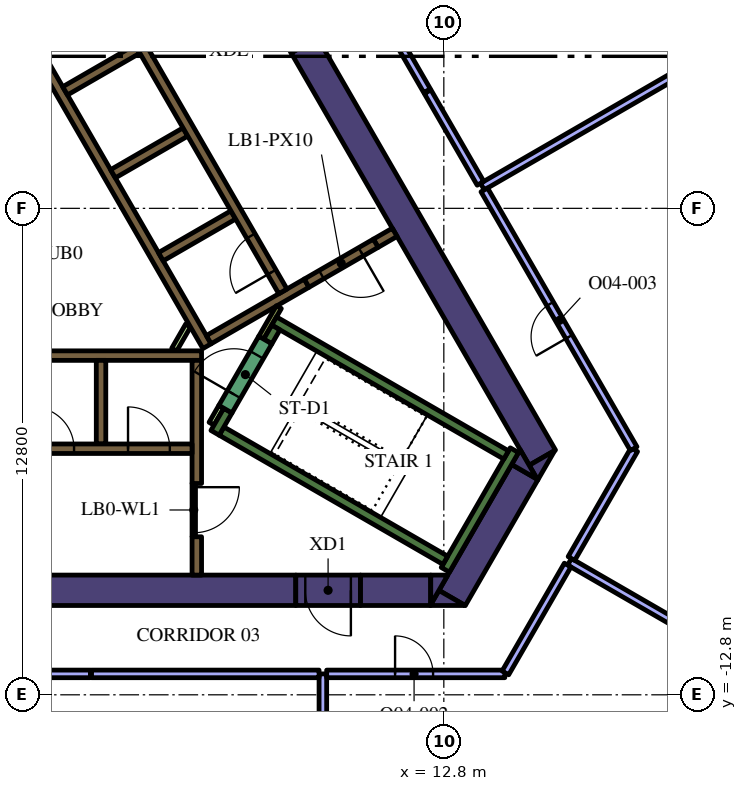
"""IFC4 building model, lengths in metres.
Left out: names, types, materials, properties, quantities, classifications, styles, units other than length and angle.
Written with IfcOpenShell. Run it as: python <this file> out.ifc"""

import sys

from ifc_helpers import new_model, si_unit, direction, frame, frame_2d, origin, place, context, subcontext, project, spatial, polyline, rectangle, outline, extrude, element, fill, save


model = new_model("IFC4")
c1 = context("Model", 3, precision=1e-05, world=origin(), true_north=direction((0.0, 1.0)))
c2 = subcontext(c1, "Body", "Model", "MODEL_VIEW")
j1 = project(units=[si_unit("LENGTHUNIT", "METRE"), si_unit("PLANEANGLEUNIT", "RADIAN")], contexts=[c1])
p1 = place(None, origin())
s1 = spatial("IfcSite", under=j1, at=p1, CompositionType="ELEMENT")
p2 = place(p1, origin())
s2 = spatial("IfcBuilding", under=s1, at=p2, CompositionType="ELEMENT")
p3 = place(p2, frame((0.0, 0.0, 179.4)))
s3 = spatial("IfcBuildingStorey", under=s2, at=p3, CompositionType="ELEMENT", Elevation=179.4)
p4 = place(p3, frame((9.129, 4.289, 0.0), z_axis=(0.0, 0.0, 1.0), x_axis=(0.499995742806, -0.866027861663, 0.0)))
e1 = element("IfcWall", 1, at=p4, inside=s3, PredefinedType="SOLIDWALL", context=c2, shape_type="SweptSolid", body=[
    extrude(rectangle(XDim=12.527, YDim=0.8, at=frame_2d((6.264, 0.0))), origin(), (0.0, 0.0, 1.0), 4.2),
])
p5 = place(p3, origin())
e2 = element("IfcWall", 2, at=p5, inside=s3, PredefinedType="SOLIDWALL", context=c2, shape_type="SweptSolid", body=[
    extrude(outline(polyline([(15.271, -7.15), (15.047, -6.762), (15.719, -6.374), (15.271, -7.15)])), origin(), (0.0, 0.0, 1.0), 4.2),
])
p6 = place(p3, frame((13.018, -10.252, 0.0), z_axis=(0.0, 0.0, 1.0), x_axis=(0.499984020225, 0.866034629516, 0.0)))
e3 = element("IfcWall", 3, at=p6, inside=s3, PredefinedType="SOLIDWALL", context=c2, shape_type="SweptSolid", body=[
    extrude(rectangle(XDim=3.824, YDim=0.8, at=frame_2d((1.912, 0.0))), origin(), (0.0, 0.0, 1.0), 4.2),
])
e4 = element("IfcWall", 4, at=p5, inside=s3, PredefinedType="SOLIDWALL", context=c2, shape_type="SweptSolid", body=[
    extrude(outline(polyline([(12.671, -10.053), (13.358, -10.45), (12.442, -10.45), (12.671, -10.053)])), origin(), (0.0, 0.0, 1.0), 4.2),
])
e5 = element("IfcWall", 5, at=p5, inside=s3, PredefinedType="SOLIDWALL", context=c2, shape_type="SweptSolid", body=[
    extrude(outline(polyline([(14.809, -6.35), (15.257, -7.126), (14.585, -6.738), (14.809, -6.35)])), origin(), (0.0, 0.0, 1.0), 4.2),
])
p7 = place(p3, frame((10.604, -10.05, 0.0), z_axis=(0.0, 0.0, 1.0), x_axis=(1.0, 0.0, 0.0)))
e6 = element("IfcWall", 6, at=p7, inside=s3, PredefinedType="SOLIDWALL", context=c2, shape_type="SweptSolid", body=[
    extrude(rectangle(XDim=1.849, YDim=0.8, at=frame_2d((0.925, 0.0))), origin(), (0.0, 0.0, 1.0), 4.2),
])
e7 = element("IfcWall", 7, at=p5, inside=s3, PredefinedType="SOLIDWALL", context=c2, shape_type="SweptSolid", body=[
    extrude(outline(polyline([(12.904, -9.65), (12.456, -10.426), (12.456, -9.65), (12.904, -9.65)])), origin(), (0.0, 0.0, 1.0), 4.2),
])
p8 = place(p3, frame((-13.378, -10.05, 0.0), z_axis=(0.0, 0.0, 1.0), x_axis=(1.0, 0.0, 0.0)))
e8 = element("IfcWall", 8, at=p8, inside=s3, PredefinedType="SOLIDWALL", context=c2, shape_type="SweptSolid", body=[
    extrude(rectangle(XDim=22.282, YDim=0.8, at=frame_2d((11.141, 0.0))), origin(), (0.0, 0.0, 1.0), 4.2),
])
p9 = place(p3, frame((12.84, -9.511, 0.0), z_axis=(0.0, 0.0, 1.0), x_axis=(0.499997733992, 0.866026712061, 0.0)))
e9 = element("IfcWall", 9, at=p9, inside=s3, PredefinedType="SOLIDWALL", context=c2, shape_type="SweptSolid", body=[
    extrude(rectangle(XDim=3.634, YDim=0.25, at=frame_2d((1.817, 0.0))), origin(), (0.0, 0.0, 1.0), 4.2),
])
p10 = place(p3, frame((12.84, -9.261, 0.0), z_axis=(0.0, 0.0, 1.0), x_axis=(-0.866013990052, 0.500019768644, 0.0)))
e10 = element("IfcWall", 10, at=p10, inside=s3, PredefinedType="SOLIDWALL", context=c2, shape_type="SweptSolid", body=[
    extrude(rectangle(XDim=6.8, YDim=0.25, at=frame_2d((3.4, 0.0))), origin(), (0.0, 0.0, 1.0), 4.2),
])
p11 = place(p3, frame((6.78, -5.906, 0.0), z_axis=(0.0, 0.0, 1.0), x_axis=(0.500223362819, 0.865896406789, 0.0)))
e11 = element("IfcWall", 11, at=p11, inside=s3, PredefinedType="SOLIDWALL", context=c2, shape_type="SweptSolid", body=[
    extrude(rectangle(XDim=0.675, YDim=0.25, at=frame_2d((0.337, 0.0))), origin(), (0.0, 0.0, 1.0), 4.2),
])
p12 = place(p3, frame((8.334, -2.964, 0.0), z_axis=(0.0, 0.0, 1.0), x_axis=(0.866016039709, -0.500016218704, 0.0)))
e12 = element("IfcWall", 12, at=p12, inside=s3, PredefinedType="SOLIDWALL", context=c2, shape_type="SweptSolid", body=[
    extrude(rectangle(XDim=7.05, YDim=0.25, at=frame_2d((3.525, 0.0))), origin(), (0.0, 0.0, 1.0), 4.2),
])
p13 = place(p3, frame((8.168, -3.503, 0.0), z_axis=(0.0, 0.0, 1.0), x_axis=(0.49972245349, 0.866185586049, 0.0)))
e13 = element("IfcWall", 13, at=p13, inside=s3, PredefinedType="SOLIDWALL", context=c2, shape_type="SweptSolid", body=[
    extrude(rectangle(XDim=0.425, YDim=0.25, at=frame_2d((0.212, 0.0))), origin(), (0.0, 0.0, 1.0), 4.2),
])
p14 = place(p3, frame((-5.545, -3.875, 0.0), z_axis=(0.0, 0.0, 1.0), x_axis=(1.0, 0.0, 0.0)))
e14 = element("IfcWall", 14, at=p14, inside=s3, PredefinedType="SOLIDWALL", context=c2, shape_type="SweptSolid", body=[
    extrude(rectangle(XDim=11.97, YDim=0.25, at=frame_2d((5.985, 0.0))), origin(), (0.0, 0.0, 1.0), 4.2),
])
p15 = place(p3, frame((6.3, -7.24, 0.0), z_axis=(0.0, 0.0, 1.0), x_axis=(0.0, 1.0, 0.0)))
e15 = element("IfcWall", 15, at=p15, inside=s3, PredefinedType="SOLIDWALL", context=c2, shape_type="SweptSolid", body=[
    extrude(rectangle(XDim=3.24, YDim=0.25, at=frame_2d((1.62, 0.0))), origin(), (0.0, 0.0, 1.0), 4.2),
])
p16 = place(p3, frame((6.3, -9.65, 0.0), z_axis=(0.0, 0.0, 1.0), x_axis=(0.0, 1.0, 0.0)))
e16 = element("IfcWall", 16, at=p16, inside=s3, PredefinedType="SOLIDWALL", context=c2, shape_type="SweptSolid", body=[
    extrude(rectangle(XDim=1.008, YDim=0.25, at=frame_2d((0.504, 0.0))), origin(), (0.0, 0.0, 1.0), 4.2),
])
p17 = place(p3, frame((3.78, -4.0, 0.0), z_axis=(0.0, 0.0, 1.0), x_axis=(0.0, -1.0, 0.0)))
e17 = element("IfcWall", 17, at=p17, inside=s3, PredefinedType="SOLIDWALL", context=c2, shape_type="SweptSolid", body=[
    extrude(rectangle(XDim=2.2, YDim=0.25, at=frame_2d((1.1, 0.0))), origin(), (0.0, 0.0, 1.0), 4.2),
])
p18 = place(p3, frame((11.507, -0.631, 0.0), z_axis=(0.0, 0.0, 1.0), x_axis=(-0.866093731455, -0.499881634324, 0.0)))
e18 = element("IfcWall", 18, at=p18, inside=s3, PredefinedType="SOLIDWALL", context=c2, shape_type="SweptSolid", body=[
    extrude(rectangle(XDim=0.575, YDim=0.25, at=frame_2d((0.288, 0.0))), origin(), (0.0, 0.0, 1.0), 4.2),
])
p19 = place(p3, frame((6.568, -3.627, 0.0), z_axis=(0.0, 0.0, 1.0), x_axis=(-0.499999455981, 0.866025717874, 0.0)))
e19 = element("IfcWall", 19, at=p19, inside=s3, PredefinedType="SOLIDWALL", context=c2, shape_type="SweptSolid", body=[
    extrude(rectangle(XDim=11.978, YDim=0.25, at=frame_2d((5.989, 0.0))), origin(), (0.0, 0.0, 1.0), 4.2),
])
for number, where, z_axis, x_axis in (
    (20, (2.834, 3.091, 0.0), (0.0, 0.0, 1.0), (0.866, 0.5, 0.0)),
    (21, (4.094, 0.909, 0.0), (0.0, 0.0, 1.0), (0.866, 0.5, 0.0)),
    (22, (5.354, -1.274, 0.0), (0.0, 0.0, 1.0), (0.866, 0.5, 0.0)),
):
    element("IfcWall", number, at=place(p3, frame(where, z_axis=z_axis, x_axis=x_axis)), inside=s3, PredefinedType="SOLIDWALL", context=c2, shape_type="SweptSolid", body=[
        extrude(rectangle(XDim=2.2, YDim=0.25, at=frame_2d((1.1, 0.0))), origin(), (0.0, 0.0, 1.0), 4.2),
    ])
p20 = place(p3, frame((6.614, -3.456, 0.0), z_axis=(0.0, 0.0, 1.0), x_axis=(0.866032512851, 0.499987686533, 0.0)))
e23 = element("IfcWall", 23, at=p20, inside=s3, PredefinedType="SOLIDWALL", context=c2, shape_type="SweptSolid", body=[
    extrude(rectangle(XDim=2.975, YDim=0.25, at=frame_2d((1.487, 0.0))), origin(), (0.0, 0.0, 1.0), 4.2),
])
p21 = place(p3, frame((6.945, -5.222, 0.0), z_axis=(0.0, 0.0, 1.0), x_axis=(-0.499818422106, -0.866130212453, 0.0)))
e24 = element("IfcWall", 24, at=p21, inside=s3, PredefinedType="PARTITIONING", context=c2, shape_type="SweptSolid", body=[
    extrude(rectangle(XDim=0.514, YDim=0.15, at=frame_2d((0.257, 0.0))), origin(), (0.0, 0.0, 1.0), 3.15),
])
p22 = place(p3, frame((8.459, -2.599, 0.0), z_axis=(0.0, 0.0, 1.0), x_axis=(-0.500041054325, -0.866001699761, 0.0)))
e25 = element("IfcWall", 25, at=p22, inside=s3, PredefinedType="PARTITIONING", context=c2, shape_type="SweptSolid", body=[
    extrude(rectangle(XDim=0.929, YDim=0.15, at=frame_2d((0.464, 0.0))), origin(), (0.0, 0.0, 1.0), 4.2),
])
p23 = place(p3, frame((5.705, -3.718, 0.0), z_axis=(0.0, 0.0, 1.0), x_axis=(0.499962090823, 0.866047289552, 0.0)))
e26 = element("IfcWall", 26, at=p23, inside=s3, PredefinedType="PARTITIONING", context=c2, shape_type="SweptSolid", body=[
    extrude(rectangle(XDim=0.735, YDim=0.15, at=frame_2d((0.367, 0.0))), origin(), (0.0, 0.0, 1.0), 3.15),
])
p24 = place(p3, frame((-6.175, -6.325, 0.0), z_axis=(0.0, 0.0, 1.0), x_axis=(1.0, 0.0, 0.0)))
e27 = element("IfcWall", 27, at=p24, inside=s3, PredefinedType="SOLIDWALL", context=c2, shape_type="SweptSolid", body=[
    extrude(rectangle(XDim=12.35, YDim=0.25, at=frame_2d((6.175, 0.0))), origin(), (0.0, 0.0, 1.0), 4.2),
])
p25 = place(p24, frame((0.585, 0.0, 0.0)))
e28 = element("IfcOpeningElement", 28, at=p25, cuts=e27, PredefinedType="OPENING", context=c2, shape_type="SweptSolid", body=[
    extrude(rectangle(XDim=1.1, YDim=2.1, at=frame_2d((0.55, 1.05))), frame((0.0, 0.135, 0.0), z_axis=(0.0, -1.0, 0.0), x_axis=(1.0, 0.0, 0.0)), (0.0, 0.0, 1.0), 0.27),
])
p26 = place(p24, frame((3.105, 0.0, 0.0)))
e29 = element("IfcOpeningElement", 29, at=p26, cuts=e27, PredefinedType="OPENING", context=c2, shape_type="SweptSolid", body=[
    extrude(rectangle(XDim=1.1, YDim=2.1, at=frame_2d((0.55, 1.05))), frame((0.0, 0.135, 0.0), z_axis=(0.0, -1.0, 0.0), x_axis=(1.0, 0.0, 0.0)), (0.0, 0.0, 1.0), 0.27),
])
p27 = place(p24, frame((5.625, 0.0, 0.0)))
e30 = element("IfcOpeningElement", 30, at=p27, cuts=e27, PredefinedType="OPENING", context=c2, shape_type="SweptSolid", body=[
    extrude(rectangle(XDim=1.1, YDim=2.1, at=frame_2d((0.55, 1.05))), frame((0.0, 0.135, 0.0), z_axis=(0.0, -1.0, 0.0), x_axis=(1.0, 0.0, 0.0)), (0.0, 0.0, 1.0), 0.27),
])
p28 = place(p24, frame((8.145, 0.0, 0.0)))
e31 = element("IfcOpeningElement", 31, at=p28, cuts=e27, PredefinedType="OPENING", context=c2, shape_type="SweptSolid", body=[
    extrude(rectangle(XDim=1.1, YDim=2.1, at=frame_2d((0.55, 1.05))), frame((0.0, 0.135, 0.0), z_axis=(0.0, -1.0, 0.0), x_axis=(1.0, 0.0, 0.0)), (0.0, 0.0, 1.0), 0.27),
])
p29 = place(p24, frame((10.665, 0.0, 0.0)))
e32 = element("IfcOpeningElement", 32, at=p29, cuts=e27, PredefinedType="OPENING", context=c2, shape_type="SweptSolid", body=[
    extrude(rectangle(XDim=1.1, YDim=2.1, at=frame_2d((0.55, 1.05))), frame((0.0, 0.135, 0.0), z_axis=(0.0, -1.0, 0.0), x_axis=(1.0, 0.0, 0.0)), (0.0, 0.0, 1.0), 0.27),
])
p30 = place(p3, frame((8.565, -2.185, 0.0), z_axis=(0.0, 0.0, 1.0), x_axis=(-0.499997954832, 0.866026584559, 0.0)))
e33 = element("IfcWall", 33, at=p30, inside=s3, PredefinedType="SOLIDWALL", context=c2, shape_type="SweptSolid", body=[
    extrude(rectangle(XDim=12.35, YDim=0.25, at=frame_2d((6.175, 0.0))), origin(), (0.0, 0.0, 1.0), 4.2),
])
p31 = place(p30, frame((0.585, 0.0, 0.0)))
e34 = element("IfcOpeningElement", 34, at=p31, cuts=e33, PredefinedType="OPENING", context=c2, shape_type="SweptSolid", body=[
    extrude(rectangle(XDim=1.1, YDim=2.1, at=frame_2d((0.55, 1.05))), frame((0.0, 0.135, 0.0), z_axis=(0.0, -1.0, 0.0), x_axis=(1.0, 0.0, 0.0)), (0.0, 0.0, 1.0), 0.27),
])
p32 = place(p3, frame((7.053, -5.284, 0.0), z_axis=(0.0, 0.0, 1.0), x_axis=(0.500078061341, 0.865980330357, 0.0)))
e35 = element("IfcWall", 35, at=p32, inside=s3, PredefinedType="SOLIDWALL", context=c2, shape_type="SweptSolid", body=[
    extrude(rectangle(XDim=2.1, YDim=0.4, at=frame_2d((1.05, 0.0))), origin(), (0.0, 0.0, 1.0), 4.2),
])
p33 = place(p32, frame((0.45, 0.0, 0.0)))
e36 = element("IfcOpeningElement", 36, at=p33, cuts=e35, PredefinedType="OPENING", context=c2, shape_type="SweptSolid", body=[
    extrude(rectangle(XDim=1.2, YDim=2.1, at=frame_2d((0.6, 1.05))), frame((0.0, 0.21, 0.0), z_axis=(0.0, -1.0, 0.0), x_axis=(1.0, 0.0, 0.0)), (0.0, 0.0, 1.0), 0.42),
])
p34 = place(p3, frame((6.22, -7.237, 0.0), z_axis=(0.0, 0.0, 1.0), x_axis=(0.0, -1.0, 0.0)))
e37 = element("IfcWall", 37, at=p34, inside=s3, PredefinedType="PARTITIONING", context=c2, shape_type="SweptSolid", body=[
    extrude(rectangle(XDim=1.4, YDim=0.09, at=frame_2d((0.7, 0.0))), origin(), (0.0, 0.0, 1.0), 3.15),
])
p35 = place(p34, frame((0.1, 0.0, 0.0)))
e38 = element("IfcOpeningElement", 38, at=p35, cuts=e37, PredefinedType="OPENING", context=c2, shape_type="SweptSolid", body=[
    extrude(rectangle(XDim=1.2, YDim=2.1, at=frame_2d((0.6, 1.05))), frame((0.0, 0.055, 0.0), z_axis=(0.0, -1.0, 0.0), x_axis=(1.0, 0.0, 0.0)), (0.0, 0.0, 1.0), 0.11),
])
p36 = place(p3, frame((11.009, -0.919, 0.0), z_axis=(0.0, 0.0, 1.0), x_axis=(-0.866059744384, -0.49994051562, 0.0)))
e39 = element("IfcWall", 39, at=p36, inside=s3, PredefinedType="SOLIDWALL", context=c2, shape_type="SweptSolid", body=[
    extrude(rectangle(XDim=2.1, YDim=0.25, at=frame_2d((1.05, 0.0))), origin(), (0.0, 0.0, 1.0), 4.2),
])
p37 = place(p36, frame((0.45, 0.0, 0.0)))
e40 = element("IfcOpeningElement", 40, at=p37, cuts=e39, PredefinedType="OPENING", context=c2, shape_type="SweptSolid", body=[
    extrude(rectangle(XDim=1.2, YDim=2.1, at=frame_2d((0.6, 1.05))), frame((0.0, 0.135, 0.0), z_axis=(0.0, -1.0, 0.0), x_axis=(1.0, 0.0, 0.0)), (0.0, 0.0, 1.0), 0.27),
])
p38 = place(p3, frame((10.604, -10.05, 0.0), z_axis=(0.0, 0.0, 1.0), x_axis=(-1.0, 0.0, 0.0)))
e41 = element("IfcWall", 41, at=p38, inside=s3, PredefinedType="SOLIDWALL", context=c2, shape_type="SweptSolid", body=[
    extrude(rectangle(XDim=1.7, YDim=0.8, at=frame_2d((0.85, 0.0))), origin(), (0.0, 0.0, 1.0), 4.2),
])
p39 = place(p38, frame((0.25, 0.0, 0.0)))
e42 = element("IfcOpeningElement", 42, at=p39, cuts=e41, PredefinedType="OPENING", context=c2, shape_type="SweptSolid", body=[
    extrude(rectangle(XDim=1.2, YDim=2.1, at=frame_2d((0.6, 1.05))), frame((0.0, 0.41, 0.0), z_axis=(0.0, -1.0, 0.0), x_axis=(1.0, 0.0, 0.0)), (0.0, 0.0, 1.0), 0.82),
])
p40 = place(p3, frame((8.279, 5.761, 0.0), z_axis=(0.0, 0.0, 1.0), x_axis=(0.500062241894, -0.865989465428, 0.0)))
e43 = element("IfcWall", 43, at=p40, inside=s3, PredefinedType="SOLIDWALL", context=c2, shape_type="SweptSolid", body=[
    extrude(rectangle(XDim=1.7, YDim=0.8, at=frame_2d((0.85, 0.0))), origin(), (0.0, 0.0, 1.0), 4.2),
])
p41 = place(p40, frame((0.25, 0.0, 0.0)))
e44 = element("IfcOpeningElement", 44, at=p41, cuts=e43, PredefinedType="OPENING", context=c2, shape_type="SweptSolid", body=[
    extrude(rectangle(XDim=1.2, YDim=2.1, at=frame_2d((0.6, 1.05))), frame((0.0, 0.41, 0.0), z_axis=(0.0, -1.0, 0.0), x_axis=(1.0, 0.0, 0.0)), (0.0, 0.0, 1.0), 0.82),
])
p42 = place(p3, frame((9.617, -12.25, 0.0), z_axis=(0.0, 0.0, 1.0), x_axis=(0.0, -1.0, 0.0)))
e45 = element("IfcWall", 45, at=p42, inside=s3, PredefinedType="PARTITIONING", context=c2, shape_type="SweptSolid", body=[
    extrude(rectangle(XDim=7.761, YDim=0.2, at=frame_2d((3.881, 0.0))), origin(), (0.0, 0.0, 1.0), 3.15),
])
p43 = place(p3, frame((-3.5, -12.25, 0.0), z_axis=(0.0, 0.0, 1.0), x_axis=(1.0, 0.0, 0.0)))
e46 = element("IfcWall", 46, at=p43, inside=s3, PredefinedType="PARTITIONING", context=c2, shape_type="SweptSolid", body=[
    extrude(rectangle(XDim=7.0, YDim=0.2, at=frame_2d((3.5, 0.0))), origin(), (0.0, 0.0, 1.0), 3.15),
])
p44 = place(p43, frame((3.0, 0.0, 0.0)))
e47 = element("IfcOpeningElement", 47, at=p44, cuts=e46, PredefinedType="OPENING", context=c2, shape_type="SweptSolid", body=[
    extrude(rectangle(XDim=1.0, YDim=2.1, at=frame_2d((0.5, 1.05))), frame((0.0, 0.11, 0.0), z_axis=(0.0, -1.0, 0.0), x_axis=(1.0, 0.0, 0.0)), (0.0, 0.0, 1.0), 0.22),
])
p45 = place(p3, frame((3.53, -12.25, 0.0), z_axis=(0.0, 0.0, 1.0), x_axis=(1.0, 0.0, 0.0)))
e48 = element("IfcWall", 48, at=p45, inside=s3, PredefinedType="PARTITIONING", context=c2, shape_type="SweptSolid", body=[
    extrude(rectangle(XDim=5.987, YDim=0.2, at=frame_2d((2.994, 0.0))), origin(), (0.0, 0.0, 1.0), 3.15),
])
p46 = place(p3, frame((16.108, -9.3, 0.0), z_axis=(0.0, 0.0, 1.0), x_axis=(0.866027180319, -0.499996922939, 0.0)))
e49 = element("IfcWall", 49, at=p46, inside=s3, PredefinedType="PARTITIONING", context=c2, shape_type="SweptSolid", body=[
    extrude(rectangle(XDim=10.754, YDim=0.2, at=frame_2d((5.377, 0.0))), origin(), (0.0, 0.0, 1.0), 3.15),
])
p47 = place(p3, frame((9.717, -12.25, 0.0), z_axis=(0.0, 0.0, 1.0), x_axis=(1.0, 0.0, 0.0)))
e50 = element("IfcWall", 50, at=p47, inside=s3, PredefinedType="PARTITIONING", context=c2, shape_type="SweptSolid", body=[
    extrude(rectangle(XDim=4.688, YDim=0.2, at=frame_2d((2.344, 0.0))), origin(), (0.0, 0.0, 1.0), 3.15),
])
p48 = place(p47, frame((1.8, 0.0, 0.0)))
e51 = element("IfcOpeningElement", 51, at=p48, cuts=e50, PredefinedType="OPENING", context=c2, shape_type="SweptSolid", body=[
    extrude(rectangle(XDim=1.0, YDim=2.1, at=frame_2d((0.5, 1.05))), frame((0.0, 0.11, 0.0), z_axis=(0.0, -1.0, 0.0), x_axis=(1.0, 0.0, 0.0)), (0.0, 0.0, 1.0), 0.22),
])
p49 = place(p3, frame((14.42, -12.224, 0.0), z_axis=(0.0, 0.0, 1.0), x_axis=(0.500001965626, 0.866024268927, 0.0)))
e52 = element("IfcWall", 52, at=p49, inside=s3, PredefinedType="PARTITIONING", context=c2, shape_type="SweptSolid", body=[
    extrude(rectangle(XDim=3.276, YDim=0.2, at=frame_2d((1.638, 0.0))), origin(), (0.0, 0.0, 1.0), 3.15),
])
p50 = place(p3, frame((13.815, 0.572, 0.0), z_axis=(0.0, 0.0, 1.0), x_axis=(0.866036391575, 0.499980968105, 0.0)))
e53 = element("IfcWall", 53, at=p50, inside=s3, PredefinedType="PARTITIONING", context=c2, shape_type="SweptSolid", body=[
    extrude(rectangle(XDim=8.42, YDim=0.2, at=frame_2d((4.21, 0.0))), origin(), (0.0, 0.0, 1.0), 3.15),
])
p51 = place(p3, frame((16.158, -9.213, 0.0), z_axis=(0.0, 0.0, 1.0), x_axis=(0.499990919662, 0.866030646256, 0.0)))
e54 = element("IfcWall", 54, at=p51, inside=s3, PredefinedType="PARTITIONING", context=c2, shape_type="SweptSolid", body=[
    extrude(rectangle(XDim=3.306, YDim=0.2, at=frame_2d((1.653, 0.0))), origin(), (0.0, 0.0, 1.0), 3.15),
])
p52 = place(p3, frame((17.796, -6.324, 0.0), z_axis=(0.0, 0.0, 1.0), x_axis=(-0.500026166427, 0.866010296064, 0.0)))
e55 = element("IfcWall", 55, at=p52, inside=s3, PredefinedType="PARTITIONING", context=c2, shape_type="SweptSolid", body=[
    extrude(rectangle(XDim=7.863, YDim=0.2, at=frame_2d((3.931, 0.0))), origin(), (0.0, 0.0, 1.0), 3.15),
])
p53 = place(p52, frame((3.4, 0.0, 0.0)))
e56 = element("IfcOpeningElement", 56, at=p53, cuts=e55, PredefinedType="OPENING", context=c2, shape_type="SweptSolid", body=[
    extrude(rectangle(XDim=1.0, YDim=2.1, at=frame_2d((0.5, 1.05))), frame((0.0, 0.11, 0.0), z_axis=(0.0, -1.0, 0.0), x_axis=(1.0, 0.0, 0.0)), (0.0, 0.0, 1.0), 0.22),
])
p54 = place(p3, frame((12.359, 3.094, 0.0), z_axis=(0.0, 0.0, 1.0), x_axis=(-0.500010275428, 0.866019471182, 0.0)))
e57 = element("IfcWall", 57, at=p54, inside=s3, PredefinedType="PARTITIONING", context=c2, shape_type="SweptSolid", body=[
    extrude(rectangle(XDim=7.0, YDim=0.2, at=frame_2d((3.5, 0.0))), origin(), (0.0, 0.0, 1.0), 3.15),
])
p55 = place(p3, frame((13.765, 0.659, 0.0), z_axis=(0.0, 0.0, 1.0), x_axis=(-0.500046568876, 0.865998515562, 0.0)))
e58 = element("IfcWall", 58, at=p55, inside=s3, PredefinedType="PARTITIONING", context=c2, shape_type="SweptSolid", body=[
    extrude(rectangle(XDim=2.782, YDim=0.2, at=frame_2d((1.391, 0.0))), origin(), (0.0, 0.0, 1.0), 3.15),
])
p56 = place(p28, origin())
e59 = element("IfcDoor", 59, at=p56, inside=s3, OperationType="DOUBLE_DOOR_SLIDING", PredefinedType="DOOR", context=c2, shape_type="SweptSolid", body=[
    extrude(rectangle(XDim=1.1, YDim=2.1, at=frame_2d((0.55, 1.05))), frame((0.0, 0.025, 0.0), z_axis=(0.0, -1.0, 0.0), x_axis=(1.0, 0.0, 0.0)), (0.0, 0.0, 1.0), 0.05),
])
fill(e31, e59)
p57 = place(p29, origin())
e60 = element("IfcDoor", 60, at=p57, inside=s3, OperationType="DOUBLE_DOOR_SLIDING", PredefinedType="DOOR", context=c2, shape_type="SweptSolid", body=[
    extrude(rectangle(XDim=1.1, YDim=2.1, at=frame_2d((0.55, 1.05))), frame((0.0, 0.025, 0.0), z_axis=(0.0, -1.0, 0.0), x_axis=(1.0, 0.0, 0.0)), (0.0, 0.0, 1.0), 0.05),
])
fill(e32, e60)
p58 = place(p31, origin())
e61 = element("IfcDoor", 61, at=p58, inside=s3, OperationType="DOUBLE_DOOR_SLIDING", PredefinedType="DOOR", context=c2, shape_type="SweptSolid", body=[
    extrude(rectangle(XDim=1.1, YDim=2.1, at=frame_2d((0.55, 1.05))), frame((0.0, 0.025, 0.0), z_axis=(0.0, -1.0, 0.0), x_axis=(1.0, 0.0, 0.0)), (0.0, 0.0, 1.0), 0.05),
])
fill(e34, e61)
p59 = place(p33, origin())
e62 = element("IfcDoor", 62, at=p59, inside=s3, OperationType="SINGLE_SWING_LEFT", PredefinedType="DOOR", context=c2, shape_type="SweptSolid", body=[
    extrude(rectangle(XDim=1.2, YDim=2.1, at=frame_2d((0.6, 1.05))), frame((0.0, 0.025, 0.0), z_axis=(0.0, -1.0, 0.0), x_axis=(1.0, 0.0, 0.0)), (0.0, 0.0, 1.0), 0.05),
])
fill(e36, e62)
p60 = place(p35, origin())
e63 = element("IfcDoor", 63, at=p60, inside=s3, OperationType="SINGLE_SWING_LEFT", PredefinedType="DOOR", context=c2, shape_type="SweptSolid", body=[
    extrude(rectangle(XDim=1.2, YDim=2.1, at=frame_2d((0.6, 1.05))), frame((0.0, 0.025, 0.0), z_axis=(0.0, -1.0, 0.0), x_axis=(1.0, 0.0, 0.0)), (0.0, 0.0, 1.0), 0.05),
])
fill(e38, e63)
p61 = place(p37, origin())
e64 = element("IfcDoor", 64, at=p61, inside=s3, OperationType="SINGLE_SWING_LEFT", PredefinedType="DOOR", context=c2, shape_type="SweptSolid", body=[
    extrude(rectangle(XDim=1.2, YDim=2.1, at=frame_2d((0.6, 1.05))), frame((0.0, 0.025, 0.0), z_axis=(0.0, -1.0, 0.0), x_axis=(1.0, 0.0, 0.0)), (0.0, 0.0, 1.0), 0.05),
])
fill(e40, e64)
p62 = place(p39, origin())
e65 = element("IfcDoor", 65, at=p62, inside=s3, OperationType="SINGLE_SWING_LEFT", PredefinedType="DOOR", context=c2, shape_type="SweptSolid", body=[
    extrude(rectangle(XDim=1.2, YDim=2.1, at=frame_2d((0.6, 1.05))), frame((0.0, 0.025, 0.0), z_axis=(0.0, -1.0, 0.0), x_axis=(1.0, 0.0, 0.0)), (0.0, 0.0, 1.0), 0.05),
])
fill(e42, e65)
p63 = place(p48, origin())
e66 = element("IfcDoor", 66, at=p63, inside=s3, OperationType="SINGLE_SWING_LEFT", PredefinedType="DOOR", context=c2, shape_type="SweptSolid", body=[
    extrude(rectangle(XDim=1.0, YDim=2.1, at=frame_2d((0.5, 1.05))), frame((0.0, 0.025, 0.0), z_axis=(0.0, -1.0, 0.0), x_axis=(1.0, 0.0, 0.0)), (0.0, 0.0, 1.0), 0.05),
])
fill(e51, e66)
p64 = place(p53, origin())
e67 = element("IfcDoor", 67, at=p64, inside=s3, OperationType="SINGLE_SWING_LEFT", PredefinedType="DOOR", context=c2, shape_type="SweptSolid", body=[
    extrude(rectangle(XDim=1.0, YDim=2.1, at=frame_2d((0.5, 1.05))), frame((0.0, 0.025, 0.0), z_axis=(0.0, -1.0, 0.0), x_axis=(1.0, 0.0, 0.0)), (0.0, 0.0, 1.0), 0.05),
])
fill(e56, e67)
save(model, sys.argv[1])
